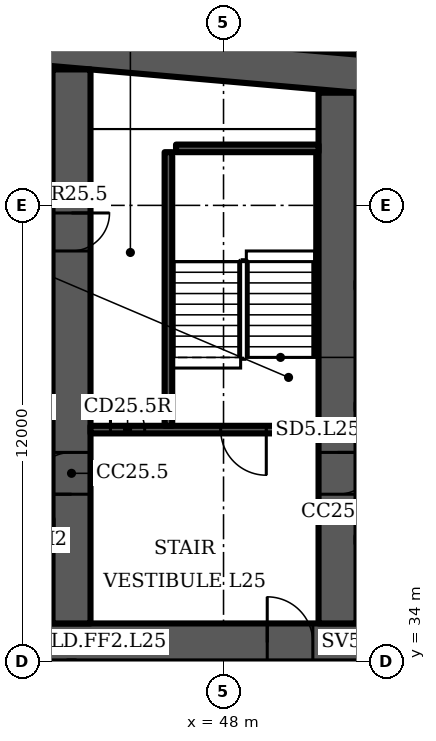
"""IFC4 building model, lengths in metres.
Left out: names, types, materials, properties, quantities, classifications, styles, units other than length and angle.
Written with IfcOpenShell. Run it as: python <this file> out.ifc"""

import sys

from ifc_helpers import new_model, si_unit, direction, frame, frame_2d, origin, place, context, subcontext, project, spatial, polyline, rectangle, outline, extrude, element, fill, save


model = new_model("IFC4")
c1 = context("Model", 3, precision=1e-05, world=origin(), true_north=direction((0.0, 1.0)))
c2 = subcontext(c1, "Body", "Model", "MODEL_VIEW")
j1 = project(units=[si_unit("LENGTHUNIT", "METRE"), si_unit("PLANEANGLEUNIT", "RADIAN")], contexts=[c1])
p1 = place(None, origin())
s1 = spatial("IfcSite", under=j1, at=p1, CompositionType="ELEMENT")
p2 = place(p1, origin())
s2 = spatial("IfcBuilding", under=s1, at=p2, CompositionType="ELEMENT")
p3 = place(p2, frame((0.0, 0.0, 111.1)))
s3 = spatial("IfcBuildingStorey", under=s2, at=p3, CompositionType="ELEMENT", Elevation=111.1)
p4 = place(p3, frame((0.0, 0.0, -0.0)))
e1 = element("IfcWall", 1, at=p4, inside=s3, PredefinedType="SHEAR", context=c2, shape_type="SweptSolid", body=[
    extrude(outline(polyline([(16.0, 47.784), (40.5, 49.927), (65.0, 47.784), (65.0, 48.787), (40.5, 50.931), (16.0, 48.787), (16.0, 47.784)])), origin(), (0.0, 0.0, 1.0), 3.6),
])
p5 = place(p3, frame((16.0, 34.5, 0.0), z_axis=(0.0, 0.0, 1.0), x_axis=(1.0, 0.0, 0.0)))
e2 = element("IfcWall", 2, at=p5, inside=s3, PredefinedType="SHEAR", context=c2, shape_type="SweptSolid", body=[
    extrude(rectangle(XDim=49.0, YDim=1.0, at=frame_2d((24.5, 0.0))), origin(), (0.0, 0.0, 1.0), 3.6),
])
p6 = place(p5, frame((1.2, 0.0, 0.0)))
e3 = element("IfcOpeningElement", 3, at=p6, cuts=e2, PredefinedType="OPENING", context=c2, shape_type="SweptSolid", body=[
    extrude(rectangle(XDim=1.1, YDim=2.1, at=frame_2d((0.55, 1.05))), frame((0.0, 0.51, 0.0), z_axis=(0.0, -1.0, 0.0), x_axis=(1.0, 0.0, 0.0)), (0.0, 0.0, 1.0), 1.02),
])
p7 = place(p5, frame((5.083, 0.0, 0.0)))
e4 = element("IfcOpeningElement", 4, at=p7, cuts=e2, PredefinedType="OPENING", context=c2, shape_type="SweptSolid", body=[
    extrude(rectangle(XDim=1.1, YDim=2.1, at=frame_2d((0.55, 1.05))), frame((0.0, 0.51, 0.0), z_axis=(0.0, -1.0, 0.0), x_axis=(1.0, 0.0, 0.0)), (0.0, 0.0, 1.0), 1.02),
])
p8 = place(p5, frame((2.933, 0.0, 0.0)))
e5 = element("IfcOpeningElement", 5, at=p8, cuts=e2, PredefinedType="OPENING", context=c2, shape_type="SweptSolid", body=[
    extrude(rectangle(XDim=1.4, YDim=2.1, at=frame_2d((0.7, 1.05))), frame((0.0, 0.51, 0.0), z_axis=(0.0, -1.0, 0.0), x_axis=(1.0, 0.0, 0.0)), (0.0, 0.0, 1.0), 1.02),
])
p9 = place(p5, frame((7.65, 0.0, 0.0)))
e6 = element("IfcOpeningElement", 6, at=p9, cuts=e2, PredefinedType="OPENING", context=c2, shape_type="SweptSolid", body=[
    extrude(rectangle(XDim=1.2, YDim=2.1, at=frame_2d((0.6, 1.05))), frame((0.0, 0.51, 0.0), z_axis=(0.0, -1.0, 0.0), x_axis=(1.0, 0.0, 0.0)), (0.0, 0.0, 1.0), 1.02),
])
p10 = place(p5, frame((14.817, 0.0, 0.0)))
e7 = element("IfcOpeningElement", 7, at=p10, cuts=e2, PredefinedType="OPENING", context=c2, shape_type="SweptSolid", body=[
    extrude(rectangle(XDim=1.1, YDim=2.1, at=frame_2d((0.55, 1.05))), frame((0.0, 0.51, 0.0), z_axis=(0.0, -1.0, 0.0), x_axis=(1.0, 0.0, 0.0)), (0.0, 0.0, 1.0), 1.02),
])
p11 = place(p5, frame((19.083, 0.0, 0.0)))
e8 = element("IfcOpeningElement", 8, at=p11, cuts=e2, PredefinedType="OPENING", context=c2, shape_type="SweptSolid", body=[
    extrude(rectangle(XDim=1.1, YDim=2.1, at=frame_2d((0.55, 1.05))), frame((0.0, 0.51, 0.0), z_axis=(0.0, -1.0, 0.0), x_axis=(1.0, 0.0, 0.0)), (0.0, 0.0, 1.0), 1.02),
])
p12 = place(p5, frame((16.8, 0.0, 0.0)))
e9 = element("IfcOpeningElement", 9, at=p12, cuts=e2, PredefinedType="OPENING", context=c2, shape_type="SweptSolid", body=[
    extrude(rectangle(XDim=1.4, YDim=2.1, at=frame_2d((0.7, 1.05))), frame((0.0, 0.51, 0.0), z_axis=(0.0, -1.0, 0.0), x_axis=(1.0, 0.0, 0.0)), (0.0, 0.0, 1.0), 1.02),
])
p13 = place(p5, frame((21.817, 0.0, 0.0)))
e10 = element("IfcOpeningElement", 10, at=p13, cuts=e2, PredefinedType="OPENING", context=c2, shape_type="SweptSolid", body=[
    extrude(rectangle(XDim=1.1, YDim=2.1, at=frame_2d((0.55, 1.05))), frame((0.0, 0.51, 0.0), z_axis=(0.0, -1.0, 0.0), x_axis=(1.0, 0.0, 0.0)), (0.0, 0.0, 1.0), 1.02),
])
p14 = place(p5, frame((26.083, 0.0, 0.0)))
e11 = element("IfcOpeningElement", 11, at=p14, cuts=e2, PredefinedType="OPENING", context=c2, shape_type="SweptSolid", body=[
    extrude(rectangle(XDim=1.1, YDim=2.1, at=frame_2d((0.55, 1.05))), frame((0.0, 0.51, 0.0), z_axis=(0.0, -1.0, 0.0), x_axis=(1.0, 0.0, 0.0)), (0.0, 0.0, 1.0), 1.02),
])
p15 = place(p5, frame((33.15, 0.0, 0.0)))
e12 = element("IfcOpeningElement", 12, at=p15, cuts=e2, PredefinedType="OPENING", context=c2, shape_type="SweptSolid", body=[
    extrude(rectangle(XDim=1.2, YDim=2.1, at=frame_2d((0.6, 1.05))), frame((0.0, 0.51, 0.0), z_axis=(0.0, -1.0, 0.0), x_axis=(1.0, 0.0, 0.0)), (0.0, 0.0, 1.0), 1.02),
])
p16 = place(p5, frame((37.8, 0.0, 0.0)))
e13 = element("IfcOpeningElement", 13, at=p16, cuts=e2, PredefinedType="OPENING", context=c2, shape_type="SweptSolid", body=[
    extrude(rectangle(XDim=1.4, YDim=2.1, at=frame_2d((0.7, 1.05))), frame((0.0, 0.51, 0.0), z_axis=(0.0, -1.0, 0.0), x_axis=(1.0, 0.0, 0.0)), (0.0, 0.0, 1.0), 1.02),
])
p17 = place(p5, frame((42.817, 0.0, 0.0)))
e14 = element("IfcOpeningElement", 14, at=p17, cuts=e2, PredefinedType="OPENING", context=c2, shape_type="SweptSolid", body=[
    extrude(rectangle(XDim=1.1, YDim=2.1, at=frame_2d((0.55, 1.05))), frame((0.0, 0.51, 0.0), z_axis=(0.0, -1.0, 0.0), x_axis=(1.0, 0.0, 0.0)), (0.0, 0.0, 1.0), 1.02),
])
p18 = place(p5, frame((46.7, 0.0, 0.0)))
e15 = element("IfcOpeningElement", 15, at=p18, cuts=e2, PredefinedType="OPENING", context=c2, shape_type="SweptSolid", body=[
    extrude(rectangle(XDim=1.1, YDim=2.1, at=frame_2d((0.55, 1.05))), frame((0.0, 0.51, 0.0), z_axis=(0.0, -1.0, 0.0), x_axis=(1.0, 0.0, 0.0)), (0.0, 0.0, 1.0), 1.02),
])
p19 = place(p5, frame((44.667, 0.0, 0.0)))
e16 = element("IfcOpeningElement", 16, at=p19, cuts=e2, PredefinedType="OPENING", context=c2, shape_type="SweptSolid", body=[
    extrude(rectangle(XDim=1.4, YDim=2.1, at=frame_2d((0.7, 1.05))), frame((0.0, 0.51, 0.0), z_axis=(0.0, -1.0, 0.0), x_axis=(1.0, 0.0, 0.0)), (0.0, 0.0, 1.0), 1.02),
])
p20 = place(p3, frame((44.0, 35.0, 0.0), z_axis=(0.0, 0.0, 1.0), x_axis=(0.0, 1.0, 0.0)))
e17 = element("IfcWall", 17, at=p20, inside=s3, PredefinedType="SHEAR", context=c2, shape_type="SweptSolid", body=[
    extrude(rectangle(XDim=14.577, YDim=1.0, at=frame_2d((7.289, 0.0))), origin(), (0.0, 0.0, 1.0), 3.6),
])
p21 = place(p20, frame((3.4, 0.0, 0.0)))
e18 = element("IfcOpeningElement", 18, at=p21, cuts=e17, PredefinedType="OPENING", context=c2, shape_type="SweptSolid", body=[
    extrude(rectangle(XDim=1.1, YDim=2.1, at=frame_2d((0.55, 1.05))), frame((0.0, 0.51, 0.0), z_axis=(0.0, -1.0, 0.0), x_axis=(1.0, 0.0, 0.0)), (0.0, 0.0, 1.0), 1.02),
])
p22 = place(p20, frame((9.8, 0.0, 0.0)))
e19 = element("IfcOpeningElement", 19, at=p22, cuts=e17, PredefinedType="OPENING", context=c2, shape_type="SweptSolid", body=[
    extrude(rectangle(XDim=1.0, YDim=2.1, at=frame_2d((0.5, 1.05))), frame((0.0, 0.51, 0.0), z_axis=(0.0, -1.0, 0.0), x_axis=(1.0, 0.0, 0.0)), (0.0, 0.0, 1.0), 1.02),
])
p23 = place(p3, frame((51.0, 35.0, 0.0), z_axis=(0.0, 0.0, 1.0), x_axis=(0.0, 1.0, 0.0)))
e20 = element("IfcWall", 20, at=p23, inside=s3, PredefinedType="SHEAR", context=c2, shape_type="SweptSolid", body=[
    extrude(rectangle(XDim=13.965, YDim=1.0, at=frame_2d((6.982, 0.0))), origin(), (0.0, 0.0, 1.0), 3.6),
])
p24 = place(p23, frame((3.4, 0.0, 0.0)))
e21 = element("IfcOpeningElement", 21, at=p24, cuts=e20, PredefinedType="OPENING", context=c2, shape_type="SweptSolid", body=[
    extrude(rectangle(XDim=1.1, YDim=2.1, at=frame_2d((0.55, 1.05))), frame((0.0, 0.51, 0.0), z_axis=(0.0, -1.0, 0.0), x_axis=(1.0, 0.0, 0.0)), (0.0, 0.0, 1.0), 1.02),
])
p25 = place(p3, frame((44.5, 40.1, 0.0), z_axis=(0.0, 0.0, 1.0), x_axis=(1.0, 0.0, 0.0)))
e22 = element("IfcWall", 22, at=p25, inside=s3, PredefinedType="SHEAR", context=c2, shape_type="SweptSolid", body=[
    extrude(rectangle(XDim=6.0, YDim=0.2, at=frame_2d((3.0, 0.0))), origin(), (0.0, 0.0, 1.0), 3.2),
])
p26 = place(p25, frame((3.425, 0.0, 0.0)))
e23 = element("IfcOpeningElement", 23, at=p26, cuts=e22, PredefinedType="OPENING", context=c2, shape_type="SweptSolid", body=[
    extrude(rectangle(XDim=1.2, YDim=2.1, at=frame_2d((0.6, 1.05))), frame((0.0, 0.11, 0.0), z_axis=(0.0, -1.0, 0.0), x_axis=(1.0, 0.0, 0.0)), (0.0, 0.0, 1.0), 0.22),
])
p27 = place(p25, frame((0.525, 0.0, 0.0)))
e24 = element("IfcOpeningElement", 24, at=p27, cuts=e22, PredefinedType="OPENING", context=c2, shape_type="SweptSolid", body=[
    extrude(rectangle(XDim=0.9, YDim=2.1, at=frame_2d((0.45, 1.05))), frame((0.0, 0.11, 0.0), z_axis=(0.0, -1.0, 0.0), x_axis=(1.0, 0.0, 0.0)), (0.0, 0.0, 1.0), 0.22),
])
p28 = place(p3, frame((46.55, 40.2, 0.0), z_axis=(0.0, 0.0, 1.0), x_axis=(0.0, 1.0, 0.0)))
e25 = element("IfcWall", 25, at=p28, inside=s3, PredefinedType="SHEAR", context=c2, shape_type="SweptSolid", body=[
    extrude(rectangle(XDim=7.2, YDim=0.2, at=frame_2d((3.6, 0.0))), origin(), (0.0, 0.0, 1.0), 3.2),
])
p29 = place(p3, frame((46.75, 47.5, 0.0), z_axis=(0.0, 0.0, 1.0), x_axis=(1.0, 0.0, 0.0)))
e26 = element("IfcWall", 26, at=p29, inside=s3, PredefinedType="SHEAR", context=c2, shape_type="SweptSolid", body=[
    extrude(rectangle(XDim=3.75, YDim=0.2, at=frame_2d((1.875, 0.0))), origin(), (0.0, 0.0, 1.0), 3.2),
])
p30 = place(p26, origin())
e27 = element("IfcDoor", 27, at=p30, inside=s3, OperationType="SINGLE_SWING_RIGHT", PredefinedType="DOOR", context=c2, shape_type="SweptSolid", body=[
    extrude(rectangle(XDim=1.2, YDim=2.1, at=frame_2d((0.6, 1.05))), frame((0.0, 0.025, 0.0), z_axis=(0.0, -1.0, 0.0), x_axis=(1.0, 0.0, 0.0)), (0.0, 0.0, 1.0), 0.05),
])
fill(e23, e27)
p31 = place(p27, origin())
e28 = element("IfcDoor", 28, at=p31, inside=s3, OperationType="SINGLE_SWING_LEFT", PredefinedType="DOOR", context=c2, shape_type="SweptSolid", body=[
    extrude(rectangle(XDim=0.9, YDim=2.1, at=frame_2d((0.45, 1.05))), frame((0.0, 0.025, 0.0), z_axis=(0.0, -1.0, 0.0), x_axis=(1.0, 0.0, 0.0)), (0.0, 0.0, 1.0), 0.05),
])
fill(e24, e28)
p32 = place(p15, origin())
e29 = element("IfcDoor", 29, at=p32, inside=s3, OperationType="SINGLE_SWING_LEFT", PredefinedType="DOOR", context=c2, shape_type="SweptSolid", body=[
    extrude(rectangle(XDim=1.2, YDim=2.1, at=frame_2d((0.6, 1.05))), frame((0.0, 0.025, 0.0), z_axis=(0.0, -1.0, 0.0), x_axis=(1.0, 0.0, 0.0)), (0.0, 0.0, 1.0), 0.05),
])
fill(e12, e29)
p33 = place(p21, origin())
e30 = element("IfcDoor", 30, at=p33, inside=s3, OperationType="SINGLE_SWING_LEFT", PredefinedType="DOOR", context=c2, shape_type="SweptSolid", body=[
    extrude(rectangle(XDim=1.1, YDim=2.1, at=frame_2d((0.55, 1.05))), frame((0.0, 0.025, 0.0), z_axis=(0.0, -1.0, 0.0), x_axis=(1.0, 0.0, 0.0)), (0.0, 0.0, 1.0), 0.05),
])
fill(e18, e30)
p34 = place(p22, origin())
e31 = element("IfcDoor", 31, at=p34, inside=s3, OperationType="SINGLE_SWING_RIGHT", PredefinedType="DOOR", context=c2, shape_type="SweptSolid", body=[
    extrude(rectangle(XDim=1.0, YDim=2.1, at=frame_2d((0.5, 1.05))), frame((0.0, 0.5, 0.0), z_axis=(0.0, -1.0, 0.0), x_axis=(1.0, 0.0, 0.0)), (0.0, 0.0, 1.0), 1.0),
])
fill(e19, e31)
p35 = place(p24, origin())
e32 = element("IfcDoor", 32, at=p35, inside=s3, OperationType="SINGLE_SWING_RIGHT", PredefinedType="DOOR", context=c2, shape_type="SweptSolid", body=[
    extrude(rectangle(XDim=1.1, YDim=2.1, at=frame_2d((0.55, 1.05))), frame((0.0, 0.025, 0.0), z_axis=(0.0, -1.0, 0.0), x_axis=(1.0, 0.0, 0.0)), (0.0, 0.0, 1.0), 0.05),
])
fill(e21, e32)
save(model, sys.argv[1])
